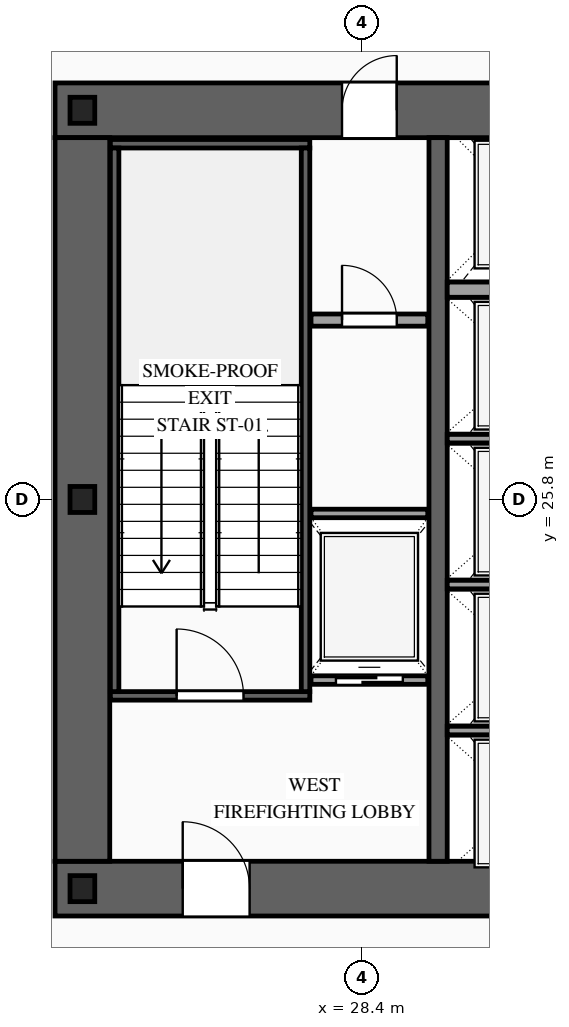
"""IFC4 building model, lengths in metres.
Left out: names, types, materials, properties, quantities, classifications, styles, units other than length and angle.
Written with IfcOpenShell. Run it as: python <this file> out.ifc"""

import sys

from ifc_helpers import new_model, si_unit, direction, frame, frame_2d, origin, origin_2d, place, context, subcontext, project, spatial, rectangle, i_section, extrude, source, transform, mapped, element, fill, save


model = new_model("IFC4")
c1 = context("Model", 3, precision=1e-05, world=origin(), true_north=direction((0.0, 1.0)))
c2 = subcontext(c1, "Body", "Model", "MODEL_VIEW")
j1 = project(units=[si_unit("LENGTHUNIT", "METRE"), si_unit("PLANEANGLEUNIT", "RADIAN")], contexts=[c1])
p1 = place(None, origin())
s1 = spatial("IfcSite", under=j1, at=p1, CompositionType="ELEMENT")
p2 = place(p1, origin())
s2 = spatial("IfcBuilding", under=s1, at=p2, CompositionType="ELEMENT")
p3 = place(p2, frame((0.0, 0.0, 15.0)))
s3 = spatial("IfcBuildingStorey", under=s2, at=p3, CompositionType="ELEMENT", Elevation=15.0)
p4 = place(p3, frame((23.35, 19.4, 0.0), z_axis=(0.0, 0.0, 1.0), x_axis=(1.0, 0.0, 0.0)))
e1 = element("IfcWall", 1, at=p4, inside=s3, PredefinedType="SHEAR", context=c2, shape_type="SweptSolid", body=[
    extrude(rectangle(XDim=27.3, YDim=0.9, at=frame_2d((13.65, 0.0))), origin(), (0.0, 0.0, 1.0), 4.8),
])
p5 = place(p4, frame((2.1, 0.0, 0.0)))
e2 = element("IfcOpeningElement", 2, at=p5, cuts=e1, PredefinedType="OPENING", context=c2, shape_type="SweptSolid", body=[
    extrude(rectangle(XDim=1.1, YDim=2.2, at=frame_2d((0.55, 1.1))), frame((0.0, 0.465, 0.0), z_axis=(0.0, -1.0, 0.0), x_axis=(1.0, 0.0, 0.0)), (0.0, 0.0, 1.0), 0.93),
])
p6 = place(p4, frame((10.0, 0.0, 0.0)))
e3 = element("IfcOpeningElement", 3, at=p6, cuts=e1, PredefinedType="OPENING", context=c2, shape_type="SweptSolid", body=[
    extrude(rectangle(XDim=1.1, YDim=2.2, at=frame_2d((0.55, 1.1))), frame((0.0, 0.465, 0.0), z_axis=(0.0, -1.0, 0.0), x_axis=(1.0, 0.0, 0.0)), (0.0, 0.0, 1.0), 0.93),
])
p7 = place(p4, frame((23.2, 0.0, 0.0)))
e4 = element("IfcOpeningElement", 4, at=p7, cuts=e1, PredefinedType="OPENING", context=c2, shape_type="SweptSolid", body=[
    extrude(rectangle(XDim=1.1, YDim=2.2, at=frame_2d((0.55, 1.1))), frame((0.0, 0.465, 0.0), z_axis=(0.0, -1.0, 0.0), x_axis=(1.0, 0.0, 0.0)), (0.0, 0.0, 1.0), 0.93),
])
p8 = place(p4, frame((19.82, 0.0, 0.0)))
e5 = element("IfcOpeningElement", 5, at=p8, cuts=e1, PredefinedType="OPENING", context=c2, shape_type="SweptSolid", body=[
    extrude(rectangle(XDim=0.9, YDim=2.15, at=frame_2d((0.45, 1.075))), frame((0.0, 0.465, 0.0), z_axis=(0.0, -1.0, 0.0), x_axis=(1.0, 0.0, 0.0)), (0.0, 0.0, 1.0), 0.93),
])
p9 = place(p4, frame((18.38, 0.0, 0.0)))
e6 = element("IfcOpeningElement", 6, at=p9, cuts=e1, PredefinedType="OPENING", context=c2, shape_type="SweptSolid", body=[
    extrude(rectangle(XDim=0.9, YDim=2.15, at=frame_2d((0.45, 1.075))), frame((0.0, 0.465, 0.0), z_axis=(0.0, -1.0, 0.0), x_axis=(1.0, 0.0, 0.0)), (0.0, 0.0, 1.0), 0.93),
])
p10 = place(p3, frame((23.35, 32.2, 0.0), z_axis=(0.0, 0.0, 1.0), x_axis=(1.0, 0.0, 0.0)))
e7 = element("IfcWall", 7, at=p10, inside=s3, PredefinedType="SHEAR", context=c2, shape_type="SweptSolid", body=[
    extrude(rectangle(XDim=27.3, YDim=0.9, at=frame_2d((13.65, 0.0))), origin(), (0.0, 0.0, 1.0), 4.8),
])
p11 = place(p10, frame((4.72, 0.0, 0.0)))
e8 = element("IfcOpeningElement", 8, at=p11, cuts=e7, PredefinedType="OPENING", context=c2, shape_type="SweptSolid", body=[
    extrude(rectangle(XDim=0.9, YDim=2.15, at=frame_2d((0.45, 1.075))), frame((0.0, 0.465, 0.0), z_axis=(0.0, -1.0, 0.0), x_axis=(1.0, 0.0, 0.0)), (0.0, 0.0, 1.0), 0.93),
])
p12 = place(p10, frame((10.0, 0.0, 0.0)))
e9 = element("IfcOpeningElement", 9, at=p12, cuts=e7, PredefinedType="OPENING", context=c2, shape_type="SweptSolid", body=[
    extrude(rectangle(XDim=1.1, YDim=2.2, at=frame_2d((0.55, 1.1))), frame((0.0, 0.465, 0.0), z_axis=(0.0, -1.0, 0.0), x_axis=(1.0, 0.0, 0.0)), (0.0, 0.0, 1.0), 0.93),
])
p13 = place(p10, frame((15.85, 0.0, 0.0)))
e10 = element("IfcOpeningElement", 10, at=p13, cuts=e7, PredefinedType="OPENING", context=c2, shape_type="SweptSolid", body=[
    extrude(rectangle(XDim=1.1, YDim=2.2, at=frame_2d((0.55, 1.1))), frame((0.0, 0.465, 0.0), z_axis=(0.0, -1.0, 0.0), x_axis=(1.0, 0.0, 0.0)), (0.0, 0.0, 1.0), 0.93),
])
p14 = place(p10, frame((19.05, 0.0, 0.0)))
e11 = element("IfcOpeningElement", 11, at=p14, cuts=e7, PredefinedType="OPENING", context=c2, shape_type="SweptSolid", body=[
    extrude(rectangle(XDim=0.9, YDim=2.15, at=frame_2d((0.45, 1.075))), frame((0.0, 0.465, 0.0), z_axis=(0.0, -1.0, 0.0), x_axis=(1.0, 0.0, 0.0)), (0.0, 0.0, 1.0), 0.93),
])
m1 = source(origin(), c2, "Body", "SweptSolid", [
    extrude(rectangle(XDim=11.9, YDim=0.9, at=frame_2d((5.95, 0.0))), origin(), (0.0, 0.0, 1.0), 4.8),
])
p15 = place(p3, frame((23.8, 19.85, 0.0), z_axis=(0.0, 0.0, 1.0), x_axis=(0.0, 1.0, 0.0)))
e12 = element("IfcWall", 12, at=p15, inside=s3, PredefinedType="SHEAR", context=c2, shape_type="MappedRepresentation", body=[
    mapped(m1, transform((0.0, 0.0, 0.0), scale=1.0)),
])
m2 = source(origin(), c2, "Body", "SweptSolid", [
    extrude(rectangle(XDim=11.9, YDim=0.3, at=frame_2d((5.95, 0.0))), origin(), (0.0, 0.0, 1.0), 4.8),
])
p16 = place(p3, frame((29.65, 19.85, 0.0), z_axis=(0.0, 0.0, 1.0), x_axis=(0.0, 1.0, 0.0)))
e13 = element("IfcWall", 13, at=p16, inside=s3, PredefinedType="SOLIDWALL", context=c2, shape_type="MappedRepresentation", body=[
    mapped(m2, transform((0.0, 0.0, 0.0), scale=1.0)),
])
m3 = source(origin(), c2, "Body", "SweptSolid", [
    extrude(i_section(OverallWidth=0.407, OverallDepth=0.428, WebThickness=0.02, FlangeThickness=0.035, at=origin_2d()), origin(), (0.0, 0.0, 1.0), 4.8),
])
for number, where, z_axis, x_axis in (
    (14, (23.8, 19.4, 0.0), (0.0, 0.0, 1.0), (1.0, 0.0, 0.0)),
    (15, (23.8, 25.8, 0.0), (0.0, 0.0, 1.0), (1.0, 0.0, 0.0)),
    (16, (23.8, 32.2, 0.0), (0.0, 0.0, 1.0), (1.0, 0.0, 0.0)),
):
    element("IfcColumn", number, at=place(p3, frame(where, z_axis=z_axis, x_axis=x_axis)), inside=s3, PredefinedType="COLUMN", context=c2, shape_type="MappedRepresentation", body=[
        mapped(m3, transform((0.0, 0.0, 0.0), scale=1.0)),
    ])
p17 = place(p3, frame((27.56, 22.83, 0.0), z_axis=(0.0, 0.0, 1.0), x_axis=(1.0, 0.0, 0.0)))
e17 = element("IfcWall", 17, at=p17, inside=s3, PredefinedType="SOLIDWALL", context=c2, shape_type="SweptSolid", body=[
    extrude(rectangle(XDim=1.92, YDim=0.14, at=frame_2d((0.96, 0.0))), origin(), (0.0, 0.0, 1.0), 4.52),
])
p18 = place(p17, frame((0.41, 0.0, 0.0)))
e18 = element("IfcOpeningElement", 18, at=p18, cuts=e17, PredefinedType="OPENING", context=c2, shape_type="SweptSolid", body=[
    extrude(rectangle(XDim=1.1, YDim=2.2, at=frame_2d((0.55, 1.1))), frame((0.0, 0.085, 0.0), z_axis=(0.0, -1.0, 0.0), x_axis=(1.0, 0.0, 0.0)), (0.0, 0.0, 1.0), 0.17),
])
m4 = source(origin(), c2, "Body", "SweptSolid", [
    extrude(rectangle(XDim=1.92, YDim=0.14, at=frame_2d((0.96, 0.0))), origin(), (0.0, 0.0, 1.0), 4.52),
])
p19 = place(p3, frame((27.56, 25.57, 0.0), z_axis=(0.0, 0.0, 1.0), x_axis=(1.0, 0.0, 0.0)))
e19 = element("IfcWall", 19, at=p19, inside=s3, PredefinedType="SOLIDWALL", context=c2, shape_type="MappedRepresentation", body=[
    mapped(m4, transform((0.0, 0.0, 0.0), scale=1.0)),
])
m5 = source(origin(), c2, "Body", "SweptSolid", [
    extrude(rectangle(XDim=2.5, YDim=0.14, at=frame_2d((1.25, 0.0))), origin(), (0.0, 0.0, 1.0), 4.52),
])
for number, where, z_axis, x_axis in (
    (20, (29.8, 22.0, 0.0), (0.0, 0.0, 1.0), (1.0, 0.0, 0.0)),
    (21, (29.8, 24.4, 0.0), (0.0, 0.0, 1.0), (1.0, 0.0, 0.0)),
    (22, (29.8, 26.8, 0.0), (0.0, 0.0, 1.0), (1.0, 0.0, 0.0)),
):
    element("IfcWall", number, at=place(p3, frame(where, z_axis=z_axis, x_axis=x_axis)), inside=s3, PredefinedType="SOLIDWALL", context=c2, shape_type="MappedRepresentation", body=[
        mapped(m5, transform((0.0, 0.0, 0.0), scale=1.0)),
    ])
m6 = source(origin(), c2, "Body", "SweptSolid", [
    extrude(rectangle(XDim=2.5, YDim=0.25, at=frame_2d((1.25, 0.0))), origin(), (0.0, 0.0, 1.0), 4.52),
])
p20 = place(p3, frame((29.8, 29.25, 0.0), z_axis=(0.0, 0.0, 1.0), x_axis=(1.0, 0.0, 0.0)))
e23 = element("IfcWall", 23, at=p20, inside=s3, PredefinedType="SOLIDWALL", context=c2, shape_type="MappedRepresentation", body=[
    mapped(m6, transform((0.0, 0.0, 0.0), scale=1.0)),
])
p21 = place(p3, frame((24.26, 22.57, 0.0), z_axis=(0.0, 0.0, 1.0), x_axis=(1.0, 0.0, 0.0)))
e24 = element("IfcWall", 24, at=p21, inside=s3, PredefinedType="SOLIDWALL", context=c2, shape_type="SweptSolid", body=[
    extrude(rectangle(XDim=3.28, YDim=0.14, at=frame_2d((1.64, 0.0))), origin(), (0.0, 0.0, 1.0), 4.52),
])
p22 = place(p21, frame((1.09, 0.0, 0.0)))
e25 = element("IfcOpeningElement", 25, at=p22, cuts=e24, PredefinedType="OPENING", context=c2, shape_type="SweptSolid", body=[
    extrude(rectangle(XDim=1.1, YDim=2.2, at=frame_2d((0.55, 1.1))), frame((0.0, 0.085, 0.0), z_axis=(0.0, -1.0, 0.0), x_axis=(1.0, 0.0, 0.0)), (0.0, 0.0, 1.0), 0.17),
])
m7 = source(origin(), c2, "Body", "SweptSolid", [
    extrude(rectangle(XDim=3.28, YDim=0.14, at=frame_2d((1.64, 0.0))), origin(), (0.0, 0.0, 1.0), 4.52),
])
p23 = place(p3, frame((24.26, 31.65, 0.0), z_axis=(0.0, 0.0, 1.0), x_axis=(1.0, 0.0, 0.0)))
e26 = element("IfcWall", 26, at=p23, inside=s3, PredefinedType="SOLIDWALL", context=c2, shape_type="MappedRepresentation", body=[
    mapped(m7, transform((0.0, 0.0, 0.0), scale=1.0)),
])
m8 = source(origin(), c2, "Body", "SweptSolid", [
    extrude(rectangle(XDim=8.94, YDim=0.14, at=frame_2d((4.47, 0.0))), origin(), (0.0, 0.0, 1.0), 4.52),
])
for number, where, z_axis, x_axis in (
    (27, (24.33, 22.64, 0.0), (0.0, 0.0, 1.0), (0.0, 1.0, 0.0)),
    (28, (27.47, 22.64, 0.0), (0.0, 0.0, 1.0), (0.0, 1.0, 0.0)),
):
    element("IfcWall", number, at=place(p3, frame(where, z_axis=z_axis, x_axis=x_axis)), inside=s3, PredefinedType="SOLIDWALL", context=c2, shape_type="MappedRepresentation", body=[
        mapped(m8, transform((0.0, 0.0, 0.0), scale=1.0)),
    ])
p24 = place(p3, frame((27.56, 28.75, 0.0), z_axis=(0.0, 0.0, 1.0), x_axis=(1.0, 0.0, 0.0)))
e29 = element("IfcWall", 29, at=p24, inside=s3, PredefinedType="PARTITIONING", context=c2, shape_type="SweptSolid", body=[
    extrude(rectangle(XDim=1.92, YDim=0.2, at=frame_2d((0.96, 0.0))), origin(), (0.0, 0.0, 1.0), 4.52),
])
p25 = place(p24, frame((0.51, 0.0, 0.0)))
e30 = element("IfcOpeningElement", 30, at=p25, cuts=e29, PredefinedType="OPENING", context=c2, shape_type="SweptSolid", body=[
    extrude(rectangle(XDim=0.9, YDim=2.15, at=frame_2d((0.45, 1.075))), frame((0.0, 0.115, 0.0), z_axis=(0.0, -1.0, 0.0), x_axis=(1.0, 0.0, 0.0)), (0.0, 0.0, 1.0), 0.23),
])
m9 = source(origin(), c2, "Body", "SweptSolid", [
    extrude(rectangle(XDim=1.1, YDim=2.2, at=frame_2d((0.55, 1.1))), frame((0.0, 0.025, 0.0), z_axis=(0.0, -1.0, 0.0), x_axis=(1.0, 0.0, 0.0)), (0.0, 0.0, 1.0), 0.05),
])
p26 = place(p18, origin())
e31 = element("IfcDoor", 31, at=p26, inside=s3, OperationType="SLIDING_TO_LEFT", PredefinedType="DOOR", context=c2, shape_type="MappedRepresentation", body=[
    mapped(m9, transform((0.0, 0.0, 0.0), scale=1.0)),
])
fill(e18, e31)
m10 = source(origin(), c2, "Body", "SweptSolid", [
    extrude(rectangle(XDim=1.1, YDim=2.2, at=frame_2d((0.55, 1.1))), frame((0.0, 0.025, 0.0), z_axis=(0.0, -1.0, 0.0), x_axis=(1.0, 0.0, 0.0)), (0.0, 0.0, 1.0), 0.05),
])
p27 = place(p22, origin())
e32 = element("IfcDoor", 32, at=p27, inside=s3, OperationType="SINGLE_SWING_LEFT", PredefinedType="DOOR", context=c2, shape_type="MappedRepresentation", body=[
    mapped(m10, transform((0.0, 0.0, 0.0), scale=1.0)),
])
fill(e25, e32)
p28 = place(p5, origin())
e33 = element("IfcDoor", 33, at=p28, inside=s3, OperationType="SINGLE_SWING_LEFT", PredefinedType="DOOR", context=c2, shape_type="MappedRepresentation", body=[
    mapped(m10, transform((0.0, 0.0, 0.0), scale=1.0)),
])
fill(e2, e33)
m11 = source(origin(), c2, "Body", "SweptSolid", [
    extrude(rectangle(XDim=0.9, YDim=2.15, at=frame_2d((0.45, 1.075))), frame((0.0, 0.025, 0.0), z_axis=(0.0, -1.0, 0.0), x_axis=(1.0, 0.0, 0.0)), (0.0, 0.0, 1.0), 0.05),
])
p29 = place(p11, origin())
e34 = element("IfcDoor", 34, at=p29, inside=s3, OperationType="SINGLE_SWING_RIGHT", PredefinedType="DOOR", context=c2, shape_type="MappedRepresentation", body=[
    mapped(m11, transform((0.0, 0.0, 0.0), scale=1.0)),
])
fill(e8, e34)
p30 = place(p25, origin())
e35 = element("IfcDoor", 35, at=p30, inside=s3, OperationType="SINGLE_SWING_LEFT", PredefinedType="DOOR", context=c2, shape_type="MappedRepresentation", body=[
    mapped(m11, transform((0.0, 0.0, 0.0), scale=1.0)),
])
fill(e30, e35)
save(model, sys.argv[1])
